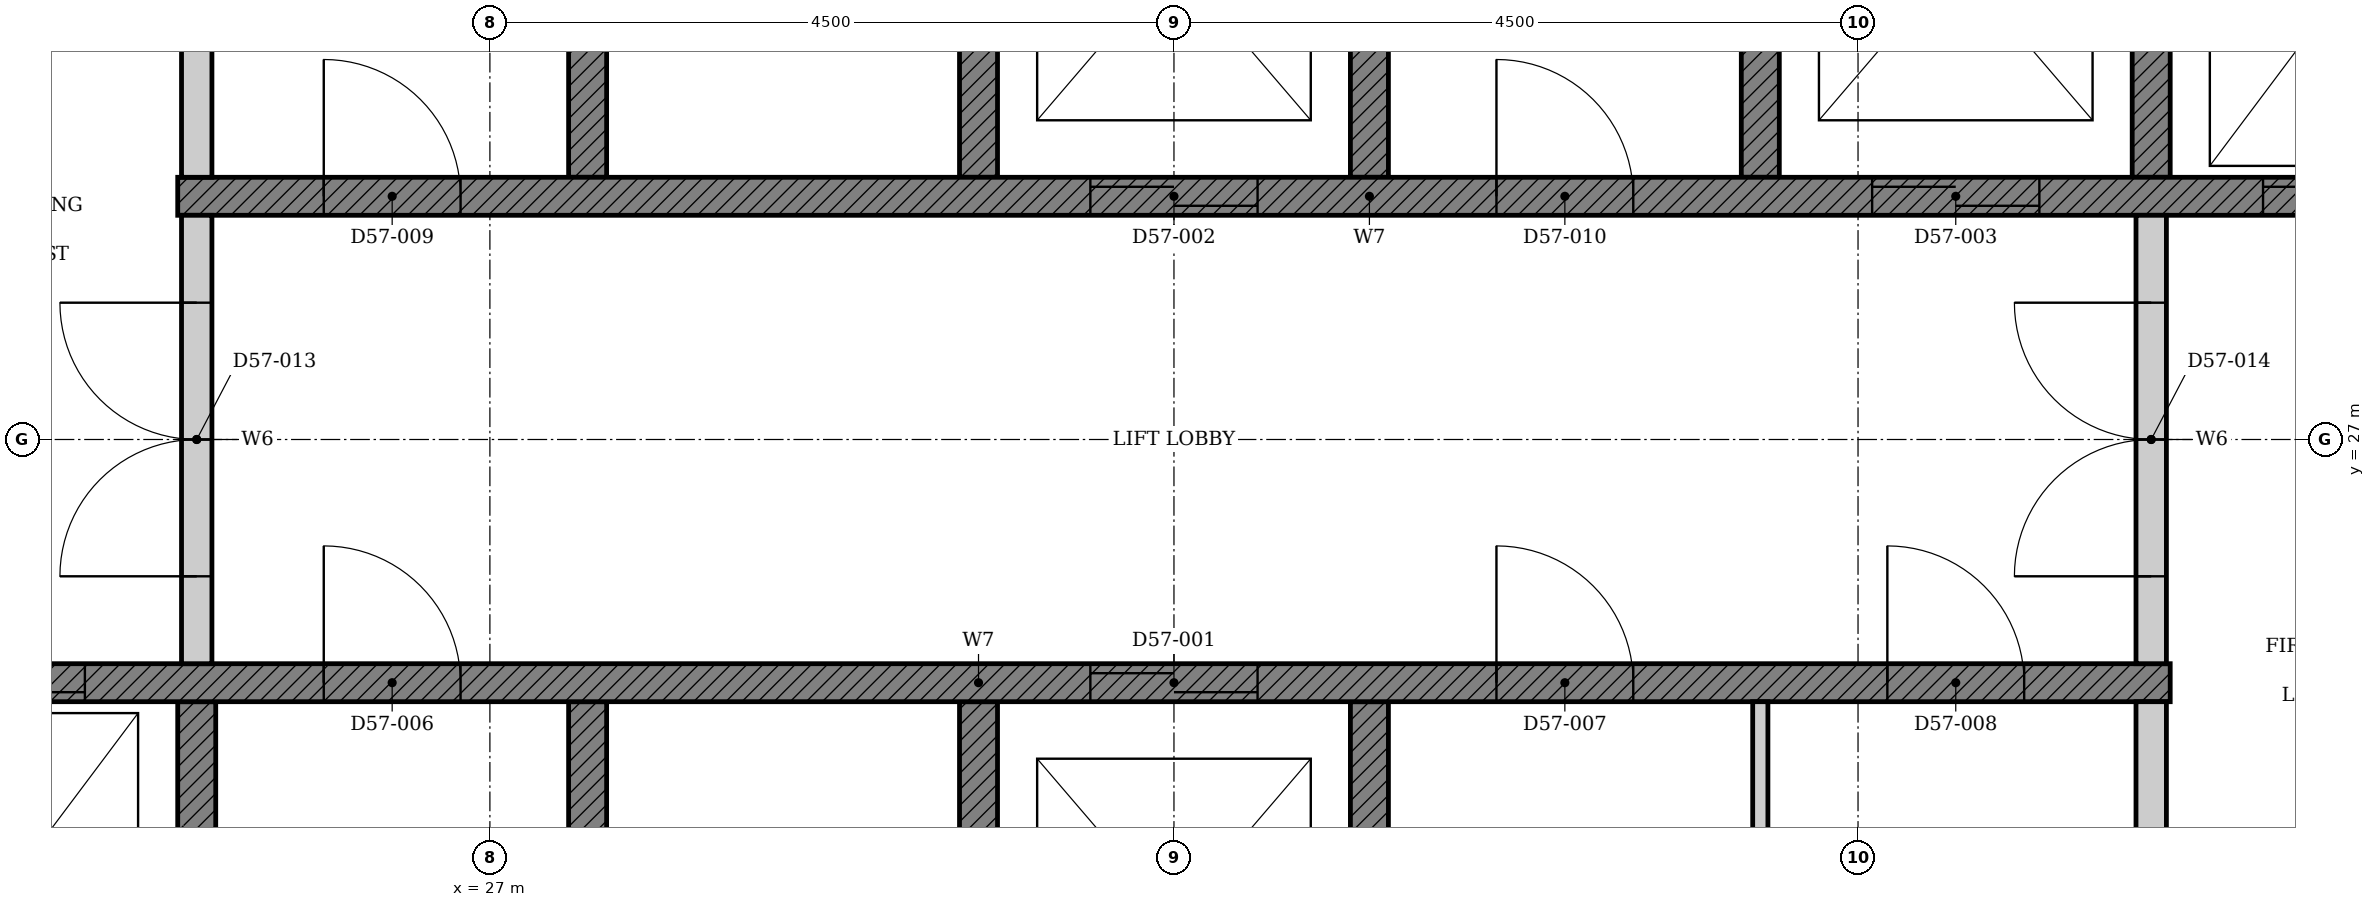
"""IFC4 building model, lengths in metres.
Left out: names, types, materials, properties, quantities, classifications, styles, units other than length and angle.
Written with IfcOpenShell. Run it as: python <this file> out.ifc"""

import sys

from ifc_helpers import new_model, si_unit, direction, frame, frame_2d, origin, place, context, subcontext, project, spatial, polyline, rectangle, outline, extrude, element, fill, save


model = new_model("IFC4")
c1 = context("Model", 3, precision=1e-05, world=origin(), true_north=direction((0.0, 1.0)))
c2 = subcontext(c1, "Body", "Model", "MODEL_VIEW")
j1 = project(units=[si_unit("LENGTHUNIT", "METRE"), si_unit("PLANEANGLEUNIT", "RADIAN")], contexts=[c1])
p1 = place(None, origin())
s1 = spatial("IfcSite", under=j1, at=p1, CompositionType="ELEMENT")
p2 = place(p1, origin())
s2 = spatial("IfcBuilding", under=s1, at=p2, CompositionType="ELEMENT")
p3 = place(p2, frame((0.0, 0.0, 225.7)))
s3 = spatial("IfcBuildingStorey", under=s2, at=p3, CompositionType="ELEMENT", Elevation=225.7)
p4 = place(p3, origin())
e1 = element("IfcWall", 1, at=p4, inside=s3, PredefinedType="SHEAR", context=c2, shape_type="SweptSolid", body=[
    extrude(outline(polyline([(22.375, 22.35), (25.197, 22.35), (25.197, 25.275), (24.947, 25.275), (24.947, 22.65), (22.625, 22.65), (22.625, 25.275), (22.375, 25.275), (22.375, 22.35)])), origin(), (0.0, 0.0, 1.0), 3.4),
])
p5 = place(p3, origin())
e2 = element("IfcWall", 2, at=p5, inside=s3, PredefinedType="SHEAR", context=c2, shape_type="SweptSolid", body=[
    extrude(outline(polyline([(27.518, 22.35), (32.911, 22.35), (32.911, 25.275), (32.661, 25.275), (32.661, 22.65), (30.339, 22.65), (30.339, 25.275), (30.089, 25.275), (30.089, 22.65), (27.768, 22.65), (27.768, 25.275), (27.518, 25.275), (27.518, 22.35)])), origin(), (0.0, 0.0, 1.0), 3.4),
])
p6 = place(p3, origin())
e3 = element("IfcWall", 3, at=p6, inside=s3, PredefinedType="SHEAR", context=c2, shape_type="SweptSolid", body=[
    extrude(outline(polyline([(27.518, 28.725), (27.768, 28.725), (27.768, 31.35), (30.089, 31.35), (30.089, 28.725), (30.339, 28.725), (30.339, 31.35), (32.661, 31.35), (32.661, 28.725), (32.911, 28.725), (32.911, 31.65), (27.518, 31.65), (27.518, 28.725)])), origin(), (0.0, 0.0, 1.0), 3.4),
])
p7 = place(p3, origin())
e4 = element("IfcWall", 4, at=p7, inside=s3, PredefinedType="SHEAR", context=c2, shape_type="SweptSolid", body=[
    extrude(outline(polyline([(35.232, 28.725), (35.482, 28.725), (35.482, 31.35), (37.803, 31.35), (37.803, 28.725), (38.053, 28.725), (38.053, 31.35), (40.375, 31.35), (40.375, 28.725), (40.625, 28.725), (40.625, 31.65), (35.232, 31.65), (35.232, 28.725)])), origin(), (0.0, 0.0, 1.0), 3.4),
])
p8 = place(p3, frame((22.375, 25.4, 0.0), z_axis=(0.0, 0.0, 1.0), x_axis=(1.0, 0.0, 0.0)))
e5 = element("IfcWall", 5, at=p8, inside=s3, PredefinedType="SHEAR", context=c2, shape_type="SweptSolid", body=[
    extrude(rectangle(XDim=15.678, YDim=0.25, at=frame_2d((7.839, 0.0))), origin(), (0.0, 0.0, 1.0), 3.4),
])
p9 = place(p8, frame((8.575, 0.0, 0.0)))
e6 = element("IfcOpeningElement", 6, at=p9, cuts=e5, PredefinedType="OPENING", context=c2, shape_type="SweptSolid", body=[
    extrude(rectangle(XDim=1.1, YDim=2.1, at=frame_2d((0.55, 1.05))), frame((0.0, 0.135, 0.0), z_axis=(0.0, -1.0, 0.0), x_axis=(1.0, 0.0, 0.0)), (0.0, 0.0, 1.0), 0.27),
])
p10 = place(p8, frame((0.861, 0.0, 0.0)))
e7 = element("IfcOpeningElement", 7, at=p10, cuts=e5, PredefinedType="OPENING", context=c2, shape_type="SweptSolid", body=[
    extrude(rectangle(XDim=1.1, YDim=2.1, at=frame_2d((0.55, 1.05))), frame((0.0, 0.135, 0.0), z_axis=(0.0, -1.0, 0.0), x_axis=(1.0, 0.0, 0.0)), (0.0, 0.0, 1.0), 0.27),
])
p11 = place(p8, frame((3.532, 0.0, 0.0)))
e8 = element("IfcOpeningElement", 8, at=p11, cuts=e5, PredefinedType="OPENING", context=c2, shape_type="SweptSolid", body=[
    extrude(rectangle(XDim=0.9, YDim=2.1, at=frame_2d((0.45, 1.05))), frame((0.0, 0.135, 0.0), z_axis=(0.0, -1.0, 0.0), x_axis=(1.0, 0.0, 0.0)), (0.0, 0.0, 1.0), 0.27),
])
p12 = place(p8, frame((11.246, 0.0, 0.0)))
e9 = element("IfcOpeningElement", 9, at=p12, cuts=e5, PredefinedType="OPENING", context=c2, shape_type="SweptSolid", body=[
    extrude(rectangle(XDim=0.9, YDim=2.1, at=frame_2d((0.45, 1.05))), frame((0.0, 0.135, 0.0), z_axis=(0.0, -1.0, 0.0), x_axis=(1.0, 0.0, 0.0)), (0.0, 0.0, 1.0), 0.27),
])
p13 = place(p8, frame((13.818, 0.0, 0.0)))
e10 = element("IfcOpeningElement", 10, at=p13, cuts=e5, PredefinedType="OPENING", context=c2, shape_type="SweptSolid", body=[
    extrude(rectangle(XDim=0.9, YDim=2.1, at=frame_2d((0.45, 1.05))), frame((0.0, 0.135, 0.0), z_axis=(0.0, -1.0, 0.0), x_axis=(1.0, 0.0, 0.0)), (0.0, 0.0, 1.0), 0.27),
])
p14 = place(p3, frame((24.947, 28.6, 0.0), z_axis=(0.0, 0.0, 1.0), x_axis=(1.0, 0.0, 0.0)))
e11 = element("IfcWall", 11, at=p14, inside=s3, PredefinedType="SHEAR", context=c2, shape_type="SweptSolid", body=[
    extrude(rectangle(XDim=15.678, YDim=0.25, at=frame_2d((7.839, 0.0))), origin(), (0.0, 0.0, 1.0), 3.4),
])
p15 = place(p14, frame((6.004, 0.0, 0.0)))
e12 = element("IfcOpeningElement", 12, at=p15, cuts=e11, PredefinedType="OPENING", context=c2, shape_type="SweptSolid", body=[
    extrude(rectangle(XDim=1.1, YDim=2.1, at=frame_2d((0.55, 1.05))), frame((0.0, 0.135, 0.0), z_axis=(0.0, -1.0, 0.0), x_axis=(1.0, 0.0, 0.0)), (0.0, 0.0, 1.0), 0.27),
])
p16 = place(p14, frame((11.146, 0.0, 0.0)))
e13 = element("IfcOpeningElement", 13, at=p16, cuts=e11, PredefinedType="OPENING", context=c2, shape_type="SweptSolid", body=[
    extrude(rectangle(XDim=1.1, YDim=2.1, at=frame_2d((0.55, 1.05))), frame((0.0, 0.135, 0.0), z_axis=(0.0, -1.0, 0.0), x_axis=(1.0, 0.0, 0.0)), (0.0, 0.0, 1.0), 0.27),
])
p17 = place(p14, frame((13.718, 0.0, 0.0)))
e14 = element("IfcOpeningElement", 14, at=p17, cuts=e11, PredefinedType="OPENING", context=c2, shape_type="SweptSolid", body=[
    extrude(rectangle(XDim=1.1, YDim=2.1, at=frame_2d((0.55, 1.05))), frame((0.0, 0.135, 0.0), z_axis=(0.0, -1.0, 0.0), x_axis=(1.0, 0.0, 0.0)), (0.0, 0.0, 1.0), 0.27),
])
p18 = place(p14, frame((0.961, 0.0, 0.0)))
e15 = element("IfcOpeningElement", 15, at=p18, cuts=e11, PredefinedType="OPENING", context=c2, shape_type="SweptSolid", body=[
    extrude(rectangle(XDim=0.9, YDim=2.1, at=frame_2d((0.45, 1.05))), frame((0.0, 0.135, 0.0), z_axis=(0.0, -1.0, 0.0), x_axis=(1.0, 0.0, 0.0)), (0.0, 0.0, 1.0), 0.27),
])
p19 = place(p14, frame((8.675, 0.0, 0.0)))
e16 = element("IfcOpeningElement", 16, at=p19, cuts=e11, PredefinedType="OPENING", context=c2, shape_type="SweptSolid", body=[
    extrude(rectangle(XDim=0.9, YDim=2.1, at=frame_2d((0.45, 1.05))), frame((0.0, 0.135, 0.0), z_axis=(0.0, -1.0, 0.0), x_axis=(1.0, 0.0, 0.0)), (0.0, 0.0, 1.0), 0.27),
])
p20 = place(p3, frame((37.928, 22.65, 0.0), z_axis=(0.0, 0.0, 1.0), x_axis=(0.0, 1.0, 0.0)))
e17 = element("IfcWall", 17, at=p20, inside=s3, PredefinedType="PARTITIONING", context=c2, shape_type="SweptSolid", body=[
    extrude(rectangle(XDim=2.625, YDim=0.2, at=frame_2d((1.312, 0.0))), origin(), (0.0, 0.0, 1.0), 3.4),
])
p21 = place(p3, frame((35.357, 22.65, 0.0), z_axis=(0.0, 0.0, 1.0), x_axis=(0.0, 1.0, 0.0)))
e18 = element("IfcWall", 18, at=p21, inside=s3, PredefinedType="PARTITIONING", context=c2, shape_type="SweptSolid", body=[
    extrude(rectangle(XDim=2.625, YDim=0.1, at=frame_2d((1.312, 0.0))), origin(), (0.0, 0.0, 1.0), 3.4),
])
p22 = place(p3, frame((25.072, 28.725, 0.0), z_axis=(0.0, 0.0, 1.0), x_axis=(0.0, 1.0, 0.0)))
e19 = element("IfcWall", 19, at=p22, inside=s3, PredefinedType="PARTITIONING", context=c2, shape_type="SweptSolid", body=[
    extrude(rectangle(XDim=2.625, YDim=0.2, at=frame_2d((1.312, 0.0))), origin(), (0.0, 0.0, 1.0), 3.4),
])
p23 = place(p3, frame((25.072, 25.525, 0.0), z_axis=(0.0, 0.0, 1.0), x_axis=(0.0, 1.0, 0.0)))
e20 = element("IfcWall", 20, at=p23, inside=s3, PredefinedType="PARTITIONING", context=c2, shape_type="SweptSolid", body=[
    extrude(rectangle(XDim=2.95, YDim=0.2, at=frame_2d((1.475, 0.0))), origin(), (0.0, 0.0, 1.0), 3.4),
])
p24 = place(p23, frame((0.575, 0.0, 0.0)))
e21 = element("IfcOpeningElement", 21, at=p24, cuts=e20, PredefinedType="OPENING", context=c2, shape_type="SweptSolid", body=[
    extrude(rectangle(XDim=1.8, YDim=2.1, at=frame_2d((0.9, 1.05))), frame((0.0, 0.11, 0.0), z_axis=(0.0, -1.0, 0.0), x_axis=(1.0, 0.0, 0.0)), (0.0, 0.0, 1.0), 0.22),
])
p25 = place(p3, frame((37.928, 25.525, 0.0), z_axis=(0.0, 0.0, 1.0), x_axis=(0.0, 1.0, 0.0)))
e22 = element("IfcWall", 22, at=p25, inside=s3, PredefinedType="PARTITIONING", context=c2, shape_type="SweptSolid", body=[
    extrude(rectangle(XDim=2.95, YDim=0.2, at=frame_2d((1.475, 0.0))), origin(), (0.0, 0.0, 1.0), 3.4),
])
p26 = place(p25, frame((0.575, 0.0, 0.0)))
e23 = element("IfcOpeningElement", 23, at=p26, cuts=e22, PredefinedType="OPENING", context=c2, shape_type="SweptSolid", body=[
    extrude(rectangle(XDim=1.8, YDim=2.1, at=frame_2d((0.9, 1.05))), frame((0.0, 0.11, 0.0), z_axis=(0.0, -1.0, 0.0), x_axis=(1.0, 0.0, 0.0)), (0.0, 0.0, 1.0), 0.22),
])
p27 = place(p9, origin())
e24 = element("IfcDoor", 24, at=p27, inside=s3, OperationType="DOUBLE_DOOR_SLIDING", PredefinedType="DOOR", context=c2, shape_type="SweptSolid", body=[
    extrude(rectangle(XDim=1.1, YDim=2.1, at=frame_2d((0.55, 1.05))), frame((0.0, 0.025, 0.0), z_axis=(0.0, -1.0, 0.0), x_axis=(1.0, 0.0, 0.0)), (0.0, 0.0, 1.0), 0.05),
])
fill(e6, e24)
p28 = place(p15, origin())
e25 = element("IfcDoor", 25, at=p28, inside=s3, OperationType="DOUBLE_DOOR_SLIDING", PredefinedType="DOOR", context=c2, shape_type="SweptSolid", body=[
    extrude(rectangle(XDim=1.1, YDim=2.1, at=frame_2d((0.55, 1.05))), frame((0.0, 0.025, 0.0), z_axis=(0.0, -1.0, 0.0), x_axis=(1.0, 0.0, 0.0)), (0.0, 0.0, 1.0), 0.05),
])
fill(e12, e25)
p29 = place(p16, origin())
e26 = element("IfcDoor", 26, at=p29, inside=s3, OperationType="DOUBLE_DOOR_SLIDING", PredefinedType="DOOR", context=c2, shape_type="SweptSolid", body=[
    extrude(rectangle(XDim=1.1, YDim=2.1, at=frame_2d((0.55, 1.05))), frame((0.0, 0.025, 0.0), z_axis=(0.0, -1.0, 0.0), x_axis=(1.0, 0.0, 0.0)), (0.0, 0.0, 1.0), 0.05),
])
fill(e13, e26)
p30 = place(p10, origin())
e27 = element("IfcDoor", 27, at=p30, inside=s3, OperationType="DOUBLE_DOOR_SLIDING", PredefinedType="DOOR", context=c2, shape_type="SweptSolid", body=[
    extrude(rectangle(XDim=1.1, YDim=2.1, at=frame_2d((0.55, 1.05))), frame((0.0, 0.025, 0.0), z_axis=(0.0, -1.0, 0.0), x_axis=(1.0, 0.0, 0.0)), (0.0, 0.0, 1.0), 0.05),
])
fill(e7, e27)
p31 = place(p17, origin())
e28 = element("IfcDoor", 28, at=p31, inside=s3, OperationType="DOUBLE_DOOR_SLIDING", PredefinedType="DOOR", context=c2, shape_type="SweptSolid", body=[
    extrude(rectangle(XDim=1.1, YDim=2.1, at=frame_2d((0.55, 1.05))), frame((0.0, 0.025, 0.0), z_axis=(0.0, -1.0, 0.0), x_axis=(1.0, 0.0, 0.0)), (0.0, 0.0, 1.0), 0.05),
])
fill(e14, e28)
p32 = place(p11, origin())
e29 = element("IfcDoor", 29, at=p32, inside=s3, OperationType="SINGLE_SWING_LEFT", PredefinedType="DOOR", context=c2, shape_type="SweptSolid", body=[
    extrude(rectangle(XDim=0.9, YDim=2.1, at=frame_2d((0.45, 1.05))), frame((0.0, 0.025, 0.0), z_axis=(0.0, -1.0, 0.0), x_axis=(1.0, 0.0, 0.0)), (0.0, 0.0, 1.0), 0.05),
])
fill(e8, e29)
p33 = place(p12, origin())
e30 = element("IfcDoor", 30, at=p33, inside=s3, OperationType="SINGLE_SWING_LEFT", PredefinedType="DOOR", context=c2, shape_type="SweptSolid", body=[
    extrude(rectangle(XDim=0.9, YDim=2.1, at=frame_2d((0.45, 1.05))), frame((0.0, 0.025, 0.0), z_axis=(0.0, -1.0, 0.0), x_axis=(1.0, 0.0, 0.0)), (0.0, 0.0, 1.0), 0.05),
])
fill(e9, e30)
p34 = place(p13, origin())
e31 = element("IfcDoor", 31, at=p34, inside=s3, OperationType="SINGLE_SWING_LEFT", PredefinedType="DOOR", context=c2, shape_type="SweptSolid", body=[
    extrude(rectangle(XDim=0.9, YDim=2.1, at=frame_2d((0.45, 1.05))), frame((0.0, 0.025, 0.0), z_axis=(0.0, -1.0, 0.0), x_axis=(1.0, 0.0, 0.0)), (0.0, 0.0, 1.0), 0.05),
])
fill(e10, e31)
p35 = place(p18, origin())
e32 = element("IfcDoor", 32, at=p35, inside=s3, OperationType="SINGLE_SWING_LEFT", PredefinedType="DOOR", context=c2, shape_type="SweptSolid", body=[
    extrude(rectangle(XDim=0.9, YDim=2.1, at=frame_2d((0.45, 1.05))), frame((0.0, 0.025, 0.0), z_axis=(0.0, -1.0, 0.0), x_axis=(1.0, 0.0, 0.0)), (0.0, 0.0, 1.0), 0.05),
])
fill(e15, e32)
p36 = place(p19, origin())
e33 = element("IfcDoor", 33, at=p36, inside=s3, OperationType="SINGLE_SWING_LEFT", PredefinedType="DOOR", context=c2, shape_type="SweptSolid", body=[
    extrude(rectangle(XDim=0.9, YDim=2.1, at=frame_2d((0.45, 1.05))), frame((0.0, 0.025, 0.0), z_axis=(0.0, -1.0, 0.0), x_axis=(1.0, 0.0, 0.0)), (0.0, 0.0, 1.0), 0.05),
])
fill(e16, e33)
p37 = place(p24, origin())
e34 = element("IfcDoor", 34, at=p37, inside=s3, OperationType="DOUBLE_DOOR_SINGLE_SWING", PredefinedType="DOOR", context=c2, shape_type="SweptSolid", body=[
    extrude(rectangle(XDim=1.8, YDim=2.1, at=frame_2d((0.9, 1.05))), frame((0.0, 0.025, 0.0), z_axis=(0.0, -1.0, 0.0), x_axis=(1.0, 0.0, 0.0)), (0.0, 0.0, 1.0), 0.05),
])
fill(e21, e34)
p38 = place(p26, origin())
e35 = element("IfcDoor", 35, at=p38, inside=s3, OperationType="DOUBLE_DOOR_SINGLE_SWING", PredefinedType="DOOR", context=c2, shape_type="SweptSolid", body=[
    extrude(rectangle(XDim=1.8, YDim=2.1, at=frame_2d((0.9, 1.05))), frame((0.0, 0.025, 0.0), z_axis=(0.0, -1.0, 0.0), x_axis=(1.0, 0.0, 0.0)), (0.0, 0.0, 1.0), 0.05),
])
fill(e23, e35)
save(model, sys.argv[1])
